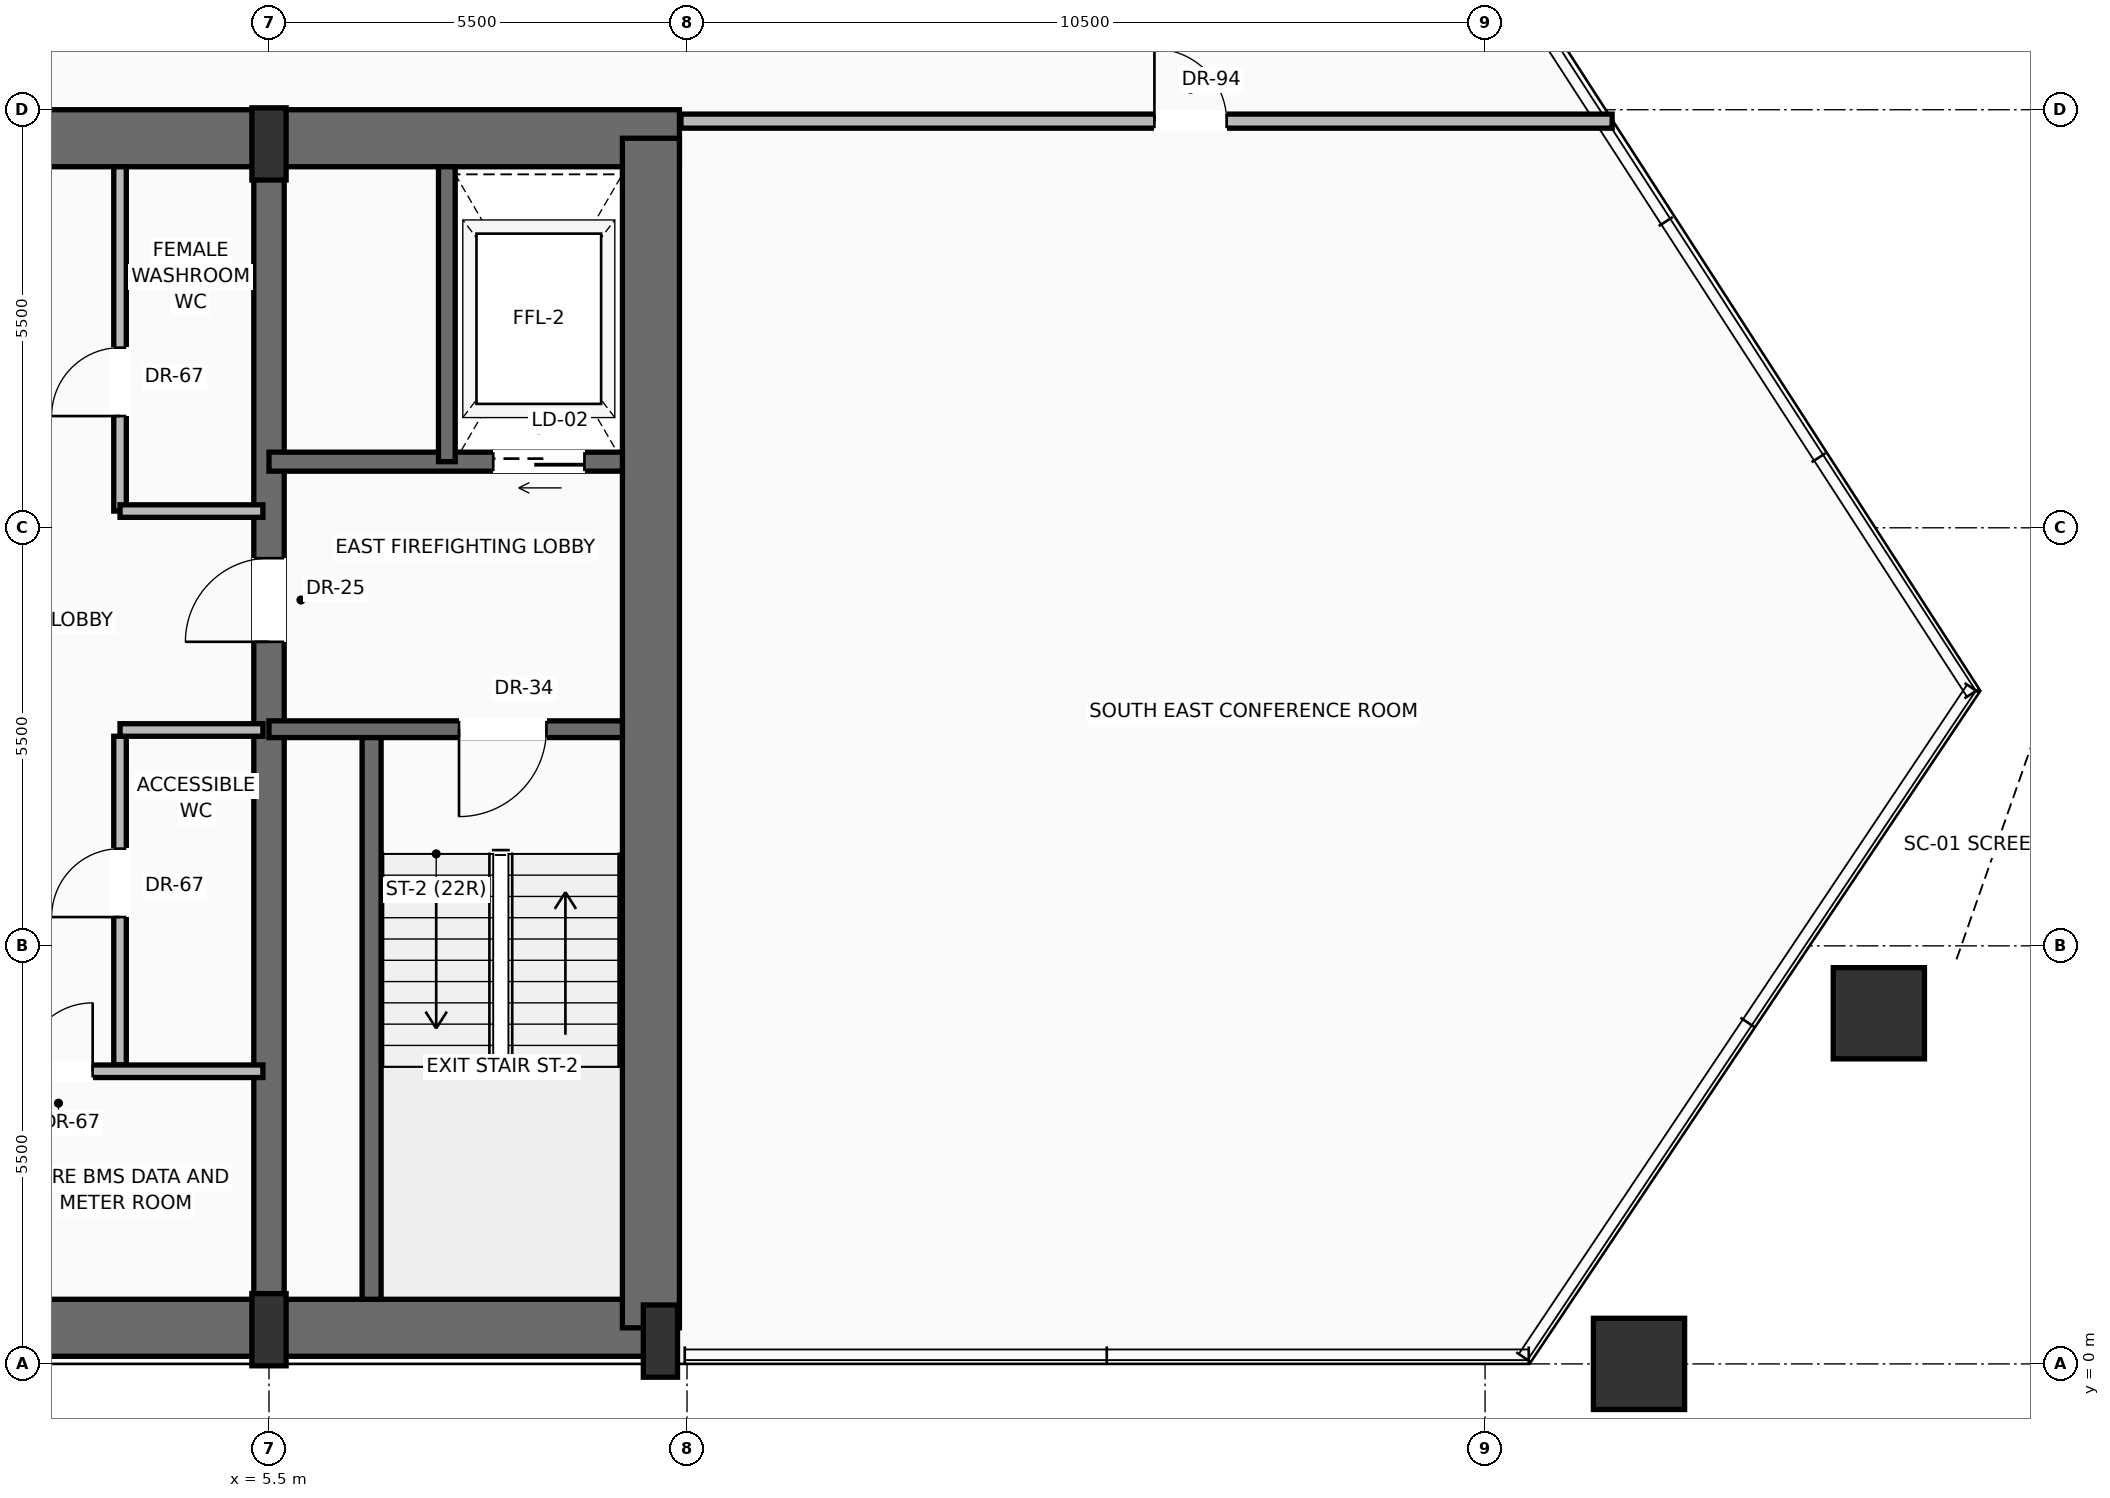
"""IFC4 building model, lengths in metres.
Left out: names, types, materials, properties, quantities, classifications, styles, units other than length and angle.
Written with IfcOpenShell. Run it as: python <this file> out.ifc"""

import sys

from ifc_helpers import new_model, si_unit, direction, frame, frame_2d, origin, origin_2d, place, context, subcontext, project, spatial, rectangle, hollow_rectangle, extrude, source, transform, mapped, element, fill, save


model = new_model("IFC4")
c1 = context("Model", 3, precision=1e-05, world=origin(), true_north=direction((0.0, 1.0)))
c2 = subcontext(c1, "Body", "Model", "MODEL_VIEW")
j1 = project(units=[si_unit("LENGTHUNIT", "METRE"), si_unit("PLANEANGLEUNIT", "RADIAN")], contexts=[c1])
p1 = place(None, origin())
s1 = spatial("IfcSite", under=j1, at=p1, CompositionType="ELEMENT")
p2 = place(p1, origin())
s2 = spatial("IfcBuilding", under=s1, at=p2, CompositionType="ELEMENT")
p3 = place(p2, frame((0.0, 0.0, 102.5)))
s3 = spatial("IfcBuildingStorey", under=s2, at=p3, CompositionType="ELEMENT", Elevation=102.5)
p4 = place(p3, frame((-10.65, 0.475, 0.0), z_axis=(0.0, 0.0, 1.0), x_axis=(1.0, 0.0, 0.0)))
e1 = element("IfcWall", 1, at=p4, inside=s3, PredefinedType="SHEAR", context=c2, shape_type="SweptSolid", body=[
    extrude(rectangle(XDim=21.3, YDim=0.75, at=frame_2d((10.65, 0.0))), origin(), (0.0, 0.0, 1.0), 3.45),
])
p5 = place(p3, frame((-10.9, 16.125, 0.0), z_axis=(0.0, 0.0, 1.0), x_axis=(1.0, 0.0, 0.0)))
e2 = element("IfcWall", 2, at=p5, inside=s3, PredefinedType="SHEAR", context=c2, shape_type="SweptSolid", body=[
    extrude(rectangle(XDim=21.8, YDim=0.75, at=frame_2d((10.9, 0.0))), origin(), (0.0, 0.0, 1.0), 3.45),
])
p6 = place(p5, frame((3.47, 0.0, 0.0)))
e3 = element("IfcOpeningElement", 3, at=p6, cuts=e2, PredefinedType="OPENING", context=c2, shape_type="SweptSolid", body=[
    extrude(rectangle(XDim=1.3, YDim=2.3, at=frame_2d((0.65, 1.15))), frame((0.0, 0.385, 0.0), z_axis=(0.0, -1.0, 0.0), x_axis=(1.0, 0.0, 0.0)), (0.0, 0.0, 1.0), 0.77),
])
p7 = place(p5, frame((9.9, 0.0, 0.0)))
e4 = element("IfcOpeningElement", 4, at=p7, cuts=e2, PredefinedType="OPENING", context=c2, shape_type="SweptSolid", body=[
    extrude(rectangle(XDim=2.0, YDim=2.4, at=frame_2d((1.0, 1.2))), frame((0.0, 0.385, 0.0), z_axis=(0.0, -1.0, 0.0), x_axis=(1.0, 0.0, 0.0)), (0.0, 0.0, 1.0), 0.77),
])
p8 = place(p3, frame((10.525, 0.475, 0.0), z_axis=(0.0, 0.0, 1.0), x_axis=(0.0, 1.0, 0.0)))
e5 = element("IfcWall", 5, at=p8, inside=s3, PredefinedType="SHEAR", context=c2, shape_type="SweptSolid", body=[
    extrude(rectangle(XDim=15.65, YDim=0.75, at=frame_2d((7.825, 0.0))), origin(), (0.0, 0.0, 1.0), 3.45),
])
p9 = place(p3, frame((5.5, 0.475, 0.0), z_axis=(0.0, 0.0, 1.0), x_axis=(0.0, 1.0, 0.0)))
e6 = element("IfcWall", 6, at=p9, inside=s3, PredefinedType="SHEAR", context=c2, shape_type="SweptSolid", body=[
    extrude(rectangle(XDim=15.65, YDim=0.4, at=frame_2d((7.825, 0.0))), origin(), (0.0, 0.0, 1.0), 3.45),
])
p10 = place(p9, frame((9.025, 0.0, 0.0)))
e7 = element("IfcOpeningElement", 7, at=p10, cuts=e6, PredefinedType="OPENING", context=c2, shape_type="SweptSolid", body=[
    extrude(rectangle(XDim=1.1, YDim=2.2, at=frame_2d((0.55, 1.1))), frame((0.0, 0.21, 0.0), z_axis=(0.0, -1.0, 0.0), x_axis=(1.0, 0.0, 0.0)), (0.0, 0.0, 1.0), 0.42),
])
m1 = source(origin(), c2, "Body", "SweptSolid", [
    extrude(rectangle(XDim=0.45, YDim=0.95, at=origin_2d()), origin(), (0.0, 0.0, 1.0), 3.7),
])
for number, where, z_axis, x_axis in (
    (8, (5.5, 0.45, 0.0), (0.0, 0.0, 1.0), (1.0, 0.0, 0.0)),
    (9, (10.65, 0.3, 0.0), (0.0, 0.0, 1.0), (1.0, 0.0, 0.0)),
    (10, (5.5, 16.05, 0.0), (0.0, 0.0, 1.0), (1.0, 0.0, 0.0)),
):
    element("IfcColumn", number, at=place(p3, frame(where, z_axis=z_axis, x_axis=x_axis)), inside=s3, PredefinedType="PILASTER", context=c2, shape_type="MappedRepresentation", body=[
        mapped(m1, transform((0.0, 0.0, 0.0), scale=1.0)),
    ])
m2 = source(origin(), c2, "Body", "SweptSolid", [
    extrude(hollow_rectangle(XDim=1.2, YDim=1.2, WallThickness=0.06, at=origin_2d()), origin(), (0.0, 0.0, 1.0), 3.691),
])
p11 = place(p3, frame((23.525, 0.0, 0.004), z_axis=(0.011507935577, 0.0, 0.999933781517), x_axis=(0.0, 1.0, 0.0)))
e11 = element("IfcColumn", 11, at=p11, inside=s3, PredefinedType="COLUMN", context=c2, shape_type="MappedRepresentation", body=[
    mapped(m2, transform((0.0, 0.0, 0.0), scale=1.0)),
])
m3 = source(origin(), c2, "Body", "SweptSolid", [
    extrude(hollow_rectangle(XDim=1.2, YDim=1.2, WallThickness=0.06, at=origin_2d()), origin(), (0.0, 0.0, 1.0), 3.692),
])
p12 = place(p3, frame((26.681, 4.613, 0.004), z_axis=(-0.001058137148, -0.015872057217, 0.999873471068), x_axis=(0.997785157857, -0.066519010524, 0.0)))
e12 = element("IfcColumn", 12, at=p12, inside=s3, PredefinedType="COLUMN", context=c2, shape_type="MappedRepresentation", body=[
    mapped(m3, transform((0.0, 0.0, 0.0), scale=1.0)),
])
p13 = place(p3, frame((6.85, 0.85, 0.0), z_axis=(0.0, 0.0, 1.0), x_axis=(0.0, 1.0, 0.0)))
e13 = element("IfcWall", 13, at=p13, inside=s3, PredefinedType="SOLIDWALL", context=c2, shape_type="SweptSolid", body=[
    extrude(rectangle(XDim=7.5, YDim=0.25, at=frame_2d((3.75, 0.0))), origin(), (0.0, 0.0, 1.0), 3.45),
])
p14 = place(p3, frame((10.15, 8.35, 0.0), z_axis=(0.0, 0.0, 1.0), x_axis=(-1.0, 0.0, 0.0)))
e14 = element("IfcWall", 14, at=p14, inside=s3, PredefinedType="SOLIDWALL", context=c2, shape_type="SweptSolid", body=[
    extrude(rectangle(XDim=4.65, YDim=0.22, at=frame_2d((2.325, 0.0))), origin(), (0.0, 0.0, 1.0), 3.45),
])
p15 = place(p14, frame((1.0, 0.0, 0.0)))
e15 = element("IfcOpeningElement", 15, at=p15, cuts=e14, PredefinedType="OPENING", context=c2, shape_type="SweptSolid", body=[
    extrude(rectangle(XDim=1.15, YDim=2.2, at=frame_2d((0.575, 1.1))), frame((0.0, 0.12, 0.0), z_axis=(0.0, -1.0, 0.0), x_axis=(1.0, 0.0, 0.0)), (0.0, 0.0, 1.0), 0.24),
])
p16 = place(p3, frame((10.15, 11.87, 0.0), z_axis=(0.0, 0.0, 1.0), x_axis=(-1.0, 0.0, 0.0)))
e16 = element("IfcWall", 16, at=p16, inside=s3, PredefinedType="SOLIDWALL", context=c2, shape_type="SweptSolid", body=[
    extrude(rectangle(XDim=4.65, YDim=0.25, at=frame_2d((2.325, 0.0))), origin(), (0.0, 0.0, 1.0), 3.45),
])
p17 = place(p16, frame((0.5, 0.0, 0.0)))
e17 = element("IfcOpeningElement", 17, at=p17, cuts=e16, PredefinedType="OPENING", context=c2, shape_type="SweptSolid", body=[
    extrude(rectangle(XDim=1.2, YDim=2.25, at=frame_2d((0.6, 1.125))), frame((0.0, 0.135, 0.0), z_axis=(0.0, -1.0, 0.0), x_axis=(1.0, 0.0, 0.0)), (0.0, 0.0, 1.0), 0.27),
])
p18 = place(p3, frame((7.84, 11.87, 0.0), z_axis=(0.0, 0.0, 1.0), x_axis=(0.0, 1.0, 0.0)))
e18 = element("IfcWall", 18, at=p18, inside=s3, PredefinedType="SOLIDWALL", context=c2, shape_type="SweptSolid", body=[
    extrude(rectangle(XDim=3.88, YDim=0.22, at=frame_2d((1.94, 0.0))), origin(), (0.0, 0.0, 1.0), 3.45),
])
p19 = place(p3, frame((3.54, 3.933, 0.0), z_axis=(0.0, 0.0, 1.0), x_axis=(0.0, 1.0, 0.0)))
e19 = element("IfcWall", 19, at=p19, inside=s3, PredefinedType="PARTITIONING", context=c2, shape_type="SweptSolid", body=[
    extrude(rectangle(XDim=4.325, YDim=0.165, at=frame_2d((2.163, 0.0))), origin(), (0.0, 0.0, 1.0), 3.442),
])
p20 = place(p19, frame((1.946, 0.0, 0.0)))
e20 = element("IfcOpeningElement", 20, at=p20, cuts=e19, PredefinedType="OPENING", context=c2, shape_type="SweptSolid", body=[
    extrude(rectangle(XDim=0.9, YDim=2.1, at=frame_2d((0.45, 1.05))), frame((0.0, 0.093, 0.0), z_axis=(0.0, -1.0, 0.0), x_axis=(1.0, 0.0, 0.0)), (0.0, 0.0, 1.0), 0.185),
])
p21 = place(p3, frame((3.54, 8.34, 0.0), z_axis=(0.0, 0.0, 1.0), x_axis=(1.0, 0.0, 0.0)))
e21 = element("IfcWall", 21, at=p21, inside=s3, PredefinedType="PARTITIONING", context=c2, shape_type="SweptSolid", body=[
    extrude(rectangle(XDim=1.88, YDim=0.165, at=frame_2d((0.94, 0.0))), origin(), (0.0, 0.0, 1.0), 3.442),
])
p22 = place(p3, frame((1.8, 3.85, 0.0), z_axis=(0.0, 0.0, 1.0), x_axis=(1.0, 0.0, 0.0)))
e22 = element("IfcWall", 22, at=p22, inside=s3, PredefinedType="PARTITIONING", context=c2, shape_type="SweptSolid", body=[
    extrude(rectangle(XDim=3.62, YDim=0.165, at=frame_2d((1.81, 0.0))), origin(), (0.0, 0.0, 1.0), 3.442),
])
p23 = place(p22, frame((0.48, 0.0, 0.0)))
e23 = element("IfcOpeningElement", 23, at=p23, cuts=e22, PredefinedType="OPENING", context=c2, shape_type="SweptSolid", body=[
    extrude(rectangle(XDim=0.9, YDim=2.1, at=frame_2d((0.45, 1.05))), frame((0.0, 0.093, 0.0), z_axis=(0.0, -1.0, 0.0), x_axis=(1.0, 0.0, 0.0)), (0.0, 0.0, 1.0), 0.185),
])
p24 = place(p3, frame((3.54, 11.22, 0.0), z_axis=(0.0, 0.0, 1.0), x_axis=(0.0, 1.0, 0.0)))
e24 = element("IfcWall", 24, at=p24, inside=s3, PredefinedType="PARTITIONING", context=c2, shape_type="SweptSolid", body=[
    extrude(rectangle(XDim=4.53, YDim=0.165, at=frame_2d((2.265, 0.0))), origin(), (0.0, 0.0, 1.0), 3.442),
])
p25 = place(p24, frame((1.25, 0.0, 0.0)))
e25 = element("IfcOpeningElement", 25, at=p25, cuts=e24, PredefinedType="OPENING", context=c2, shape_type="SweptSolid", body=[
    extrude(rectangle(XDim=0.9, YDim=2.1, at=frame_2d((0.45, 1.05))), frame((0.0, 0.093, 0.0), z_axis=(0.0, -1.0, 0.0), x_axis=(1.0, 0.0, 0.0)), (0.0, 0.0, 1.0), 0.185),
])
p26 = place(p3, frame((3.54, 11.22, 0.0), z_axis=(0.0, 0.0, 1.0), x_axis=(1.0, 0.0, 0.0)))
e26 = element("IfcWall", 26, at=p26, inside=s3, PredefinedType="PARTITIONING", context=c2, shape_type="SweptSolid", body=[
    extrude(rectangle(XDim=1.88, YDim=0.165, at=frame_2d((0.94, 0.0))), origin(), (0.0, 0.0, 1.0), 3.442),
])
p27 = place(p3, frame((10.92, 16.35, 0.0), z_axis=(0.0, 0.0, 1.0), x_axis=(1.0, 0.0, 0.0)))
e27 = element("IfcWall", 27, at=p27, inside=s3, PredefinedType="PARTITIONING", context=c2, shape_type="SweptSolid", body=[
    extrude(rectangle(XDim=12.252, YDim=0.185, at=frame_2d((6.126, 0.0))), origin(), (0.0, 0.0, 1.0), 2.747),
])
p28 = place(p27, frame((6.229, 0.0, 0.0)))
e28 = element("IfcOpeningElement", 28, at=p28, cuts=e27, PredefinedType="OPENING", context=c2, shape_type="SweptSolid", body=[
    extrude(rectangle(XDim=0.95, YDim=2.2, at=frame_2d((0.475, 1.1))), frame((0.0, 0.103, 0.0), z_axis=(0.0, -1.0, 0.0), x_axis=(1.0, 0.0, 0.0)), (0.0, 0.0, 1.0), 0.205),
])
m4 = source(origin(), c2, "Body", "SweptSolid", [
    extrude(rectangle(XDim=1.15, YDim=2.2, at=frame_2d((0.575, 1.1))), frame((0.0, 0.025, 0.0), z_axis=(0.0, -1.0, 0.0), x_axis=(1.0, 0.0, 0.0)), (0.0, 0.0, 1.0), 0.05),
])
p29 = place(p15, origin())
e29 = element("IfcDoor", 29, at=p29, inside=s3, OperationType="SINGLE_SWING_RIGHT", PredefinedType="DOOR", context=c2, shape_type="MappedRepresentation", body=[
    mapped(m4, transform((0.0, 0.0, 0.0), scale=1.0)),
])
fill(e15, e29)
m5 = source(origin(), c2, "Body", "SweptSolid", [
    extrude(rectangle(XDim=1.1, YDim=2.2, at=frame_2d((0.55, 1.1))), frame((0.0, 0.025, 0.0), z_axis=(0.0, -1.0, 0.0), x_axis=(1.0, 0.0, 0.0)), (0.0, 0.0, 1.0), 0.05),
])
p30 = place(p10, origin())
e30 = element("IfcDoor", 30, at=p30, inside=s3, OperationType="SINGLE_SWING_LEFT", PredefinedType="DOOR", context=c2, shape_type="MappedRepresentation", body=[
    mapped(m5, transform((0.0, 0.0, 0.0), scale=1.0)),
])
fill(e7, e30)
m6 = source(origin(), c2, "Body", "SweptSolid", [
    extrude(rectangle(XDim=1.2, YDim=2.25, at=frame_2d((0.6, 1.125))), frame((0.0, 0.025, 0.0), z_axis=(0.0, -1.0, 0.0), x_axis=(1.0, 0.0, 0.0)), (0.0, 0.0, 1.0), 0.05),
])
p31 = place(p17, origin())
e31 = element("IfcDoor", 31, at=p31, inside=s3, OperationType="SLIDING_TO_RIGHT", PredefinedType="DOOR", context=c2, shape_type="MappedRepresentation", body=[
    mapped(m6, transform((0.0, 0.0, 0.0), scale=1.0)),
])
fill(e17, e31)
m7 = source(origin(), c2, "Body", "SweptSolid", [
    extrude(rectangle(XDim=0.9, YDim=2.1, at=frame_2d((0.45, 1.05))), frame((0.0, 0.025, 0.0), z_axis=(0.0, -1.0, 0.0), x_axis=(1.0, 0.0, 0.0)), (0.0, 0.0, 1.0), 0.05),
])
p32 = place(p23, origin())
e32 = element("IfcDoor", 32, at=p32, inside=s3, OperationType="SINGLE_SWING_RIGHT", PredefinedType="DOOR", context=c2, shape_type="MappedRepresentation", body=[
    mapped(m7, transform((0.0, 0.0, 0.0), scale=1.0)),
])
fill(e23, e32)
p33 = place(p20, origin())
e33 = element("IfcDoor", 33, at=p33, inside=s3, OperationType="SINGLE_SWING_LEFT", PredefinedType="DOOR", context=c2, shape_type="MappedRepresentation", body=[
    mapped(m7, transform((0.0, 0.0, 0.0), scale=1.0)),
])
fill(e20, e33)
p34 = place(p25, origin())
e34 = element("IfcDoor", 34, at=p34, inside=s3, OperationType="SINGLE_SWING_LEFT", PredefinedType="DOOR", context=c2, shape_type="MappedRepresentation", body=[
    mapped(m7, transform((0.0, 0.0, 0.0), scale=1.0)),
])
fill(e25, e34)
m8 = source(origin(), c2, "Body", "SweptSolid", [
    extrude(rectangle(XDim=0.95, YDim=2.2, at=frame_2d((0.475, 1.1))), frame((0.0, 0.025, 0.0), z_axis=(0.0, -1.0, 0.0), x_axis=(1.0, 0.0, 0.0)), (0.0, 0.0, 1.0), 0.05),
])
p35 = place(p28, origin())
e35 = element("IfcDoor", 35, at=p35, inside=s3, OperationType="SINGLE_SWING_LEFT", PredefinedType="DOOR", context=c2, shape_type="MappedRepresentation", body=[
    mapped(m8, transform((0.0, 0.0, 0.0), scale=1.0)),
])
fill(e28, e35)
save(model, sys.argv[1])
